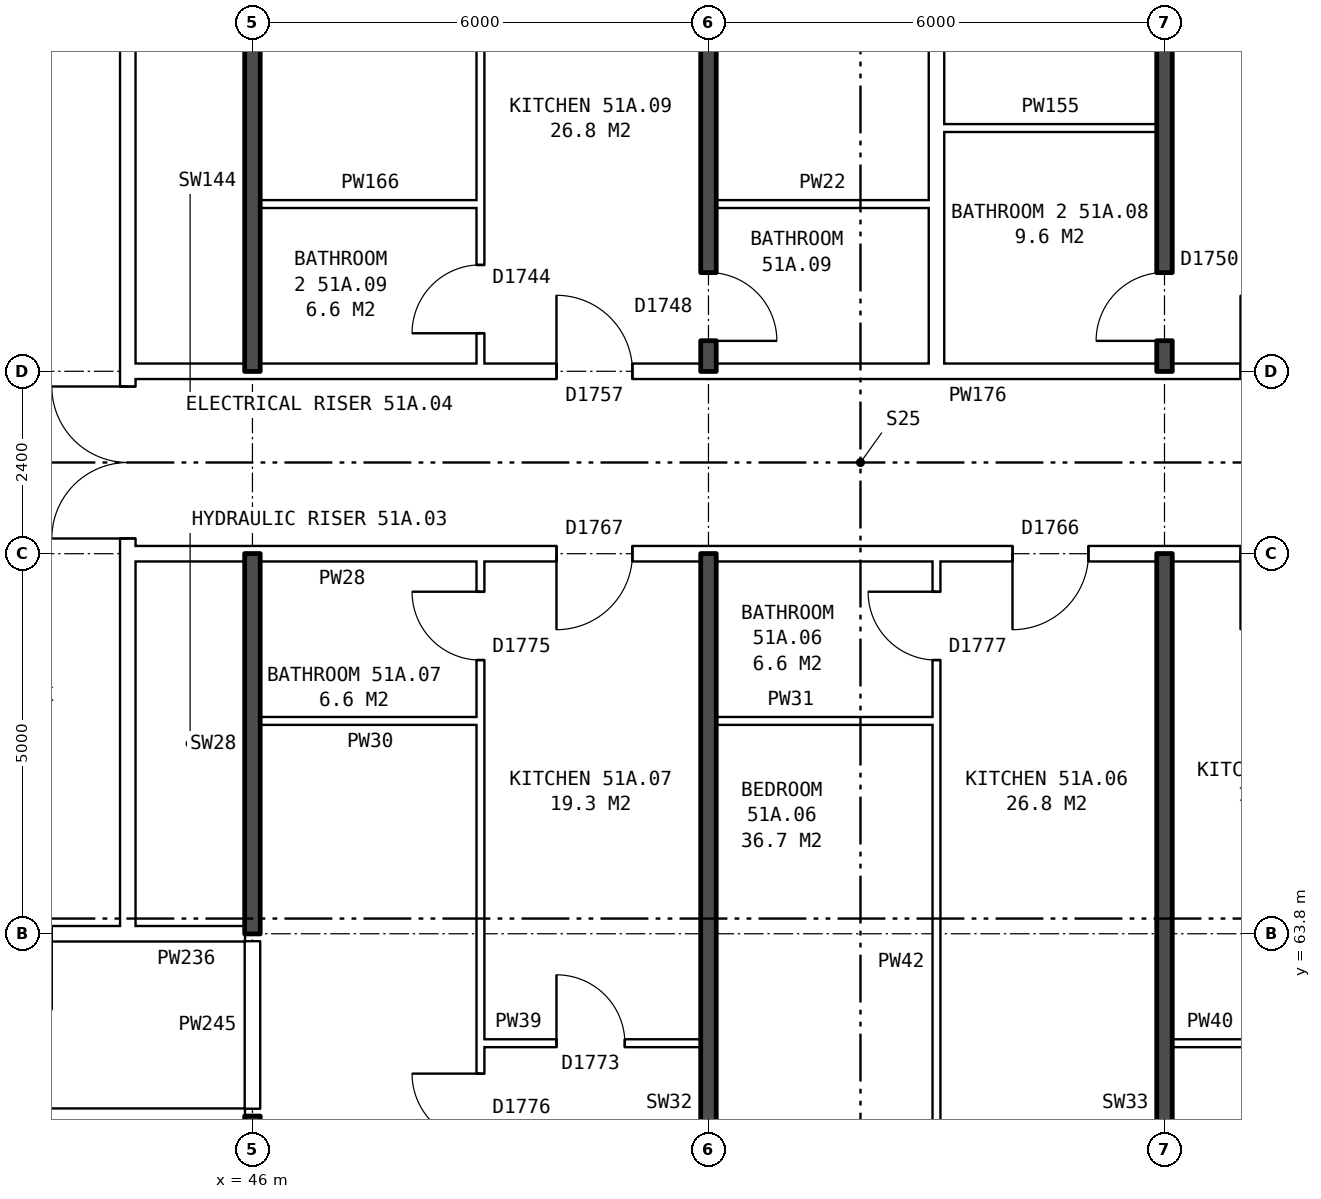
"""IFC4 building model, lengths in metres.
Left out: names, types, materials, properties, quantities, classifications, styles, units other than length and angle.
Written with IfcOpenShell. Run it as: python <this file> out.ifc"""

import sys

from ifc_helpers import new_model, si_unit, direction, frame, frame_2d, origin, place, context, subcontext, project, spatial, rectangle, extrude, element, fill, save


model = new_model("IFC4")
c1 = context("Model", 3, precision=1e-05, world=origin(), true_north=direction((0.0, 1.0)))
c2 = subcontext(c1, "Body", "Model", "MODEL_VIEW")
j1 = project(units=[si_unit("LENGTHUNIT", "METRE"), si_unit("PLANEANGLEUNIT", "RADIAN")], contexts=[c1])
p1 = place(None, origin())
s1 = spatial("IfcSite", under=j1, at=p1, CompositionType="ELEMENT")
p2 = place(p1, origin())
s2 = spatial("IfcBuilding", under=s1, at=p2, CompositionType="ELEMENT")
p3 = place(p2, frame((0.0, 0.0, 182.0)))
s3 = spatial("IfcBuildingStorey", under=s2, at=p3, CompositionType="ELEMENT", Elevation=182.0)
p4 = place(p3, frame((44.36, 63.9, 0.0), z_axis=(0.0, 0.0, 1.0), x_axis=(0.0, 1.0, 0.0)))
e1 = element("IfcWall", 1, at=p4, inside=s3, PredefinedType="PARTITIONING", context=c2, shape_type="SweptSolid", body=[
    extrude(rectangle(XDim=12.2, YDim=0.2, at=frame_2d((6.1, 0.0))), origin(), (0.0, 0.0, 1.0), 2.85),
])
p5 = place(p4, frame((5.1, 0.0, 0.0)))
e2 = element("IfcOpeningElement", 2, at=p5, cuts=e1, PredefinedType="OPENING", context=c2, shape_type="SweptSolid", body=[
    extrude(rectangle(XDim=2.0, YDim=2.1, at=frame_2d((1.0, 1.05))), frame((0.0, 0.11, 0.0), z_axis=(0.0, -1.0, 0.0), x_axis=(1.0, 0.0, 0.0)), (0.0, 0.0, 1.0), 0.22),
])
p6 = place(p3, frame((30.61, 61.4, 0.0), z_axis=(0.0, 0.0, 1.0), x_axis=(1.0, 0.0, 0.0)))
e3 = element("IfcWall", 3, at=p6, inside=s3, PredefinedType="PARTITIONING", context=c2, shape_type="SweptSolid", body=[
    extrude(rectangle(XDim=15.29, YDim=0.2, at=frame_2d((7.645, 0.0))), origin(), (0.0, 0.0, 1.0), 2.85),
])
p7 = place(p6, frame((10.69, 0.0, 0.0)))
e4 = element("IfcOpeningElement", 4, at=p7, cuts=e3, PredefinedType="OPENING", context=c2, shape_type="SweptSolid", body=[
    extrude(rectangle(XDim=1.0, YDim=2.1, at=frame_2d((0.5, 1.05))), frame((0.0, 0.11, 0.0), z_axis=(0.0, -1.0, 0.0), x_axis=(1.0, 0.0, 0.0)), (0.0, 0.0, 1.0), 0.22),
])
p8 = place(p6, frame((5.89, 0.0, 0.0)))
e5 = element("IfcOpeningElement", 5, at=p8, cuts=e3, PredefinedType="OPENING", context=c2, shape_type="SweptSolid", body=[
    extrude(rectangle(XDim=1.0, YDim=2.1, at=frame_2d((0.5, 1.05))), frame((0.0, 0.11, 0.0), z_axis=(0.0, -1.0, 0.0), x_axis=(1.0, 0.0, 0.0)), (0.0, 0.0, 1.0), 0.22),
])
p9 = place(p3, frame((49.0, 62.36, 0.0), z_axis=(0.0, 0.0, 1.0), x_axis=(1.0, 0.0, 0.0)))
e6 = element("IfcWall", 6, at=p9, inside=s3, PredefinedType="PARTITIONING", context=c2, shape_type="SweptSolid", body=[
    extrude(rectangle(XDim=2.9, YDim=0.1, at=frame_2d((1.45, 0.0))), origin(), (0.0, 0.0, 1.0), 2.85),
])
p10 = place(p9, frame((1.0, 0.0, 0.0)))
e7 = element("IfcOpeningElement", 7, at=p10, cuts=e6, PredefinedType="OPENING", context=c2, shape_type="SweptSolid", body=[
    extrude(rectangle(XDim=0.9, YDim=2.1, at=frame_2d((0.45, 1.05))), frame((0.0, 0.06, 0.0), z_axis=(0.0, -1.0, 0.0), x_axis=(1.0, 0.0, 0.0)), (0.0, 0.0, 1.0), 0.12),
])
p11 = place(p3, frame((58.1, 62.36, 0.0), z_axis=(0.0, 0.0, 1.0), x_axis=(1.0, 0.0, 0.0)))
e8 = element("IfcWall", 8, at=p11, inside=s3, PredefinedType="PARTITIONING", context=c2, shape_type="SweptSolid", body=[
    extrude(rectangle(XDim=2.9, YDim=0.1, at=frame_2d((1.45, 0.0))), origin(), (0.0, 0.0, 1.0), 2.85),
])
p12 = place(p11, frame((1.0, 0.0, 0.0)))
e9 = element("IfcOpeningElement", 9, at=p12, cuts=e8, PredefinedType="OPENING", context=c2, shape_type="SweptSolid", body=[
    extrude(rectangle(XDim=0.9, YDim=2.1, at=frame_2d((0.45, 1.05))), frame((0.0, 0.06, 0.0), z_axis=(0.0, -1.0, 0.0), x_axis=(1.0, 0.0, 0.0)), (0.0, 0.0, 1.0), 0.12),
])
p13 = place(p3, frame((41.36, 63.8, 0.0), z_axis=(0.0, 0.0, 1.0), x_axis=(1.0, 0.0, 0.0)))
e10 = element("IfcWall", 10, at=p13, inside=s3, PredefinedType="PARTITIONING", context=c2, shape_type="SweptSolid", body=[
    extrude(rectangle(XDim=3.0, YDim=0.2, at=frame_2d((1.5, 0.0))), origin(), (0.0, 0.0, 1.0), 2.85),
])
p14 = place(p13, frame((1.0, 0.0, 0.0)))
e11 = element("IfcOpeningElement", 11, at=p14, cuts=e10, PredefinedType="OPENING", context=c2, shape_type="SweptSolid", body=[
    extrude(rectangle(XDim=1.0, YDim=2.1, at=frame_2d((0.5, 1.05))), frame((0.0, 0.11, 0.0), z_axis=(0.0, -1.0, 0.0), x_axis=(1.0, 0.0, 0.0)), (0.0, 0.0, 1.0), 0.22),
])
p15 = place(p3, frame((44.36, 63.8, 0.0), z_axis=(0.0, 0.0, 1.0), x_axis=(1.0, 0.0, 0.0)))
e12 = element("IfcWall", 12, at=p15, inside=s3, PredefinedType="PARTITIONING", context=c2, shape_type="SweptSolid", body=[
    extrude(rectangle(XDim=1.54, YDim=0.2, at=frame_2d((0.77, 0.0))), origin(), (0.0, 0.0, 1.0), 2.85),
])
for number, where, z_axis, x_axis in (
    (13, (46.1, 66.6, 0.0), (0.0, 0.0, 1.0), (1.0, 0.0, 0.0)),
    (14, (52.1, 66.6, 0.0), (0.0, 0.0, 1.0), (1.0, 0.0, 0.0)),
):
    element("IfcWall", number, at=place(p3, frame(where, z_axis=z_axis, x_axis=x_axis)), inside=s3, PredefinedType="PARTITIONING", context=c2, shape_type="SweptSolid", body=[
        extrude(rectangle(XDim=2.9, YDim=0.1, at=frame_2d((1.45, 0.0))), origin(), (0.0, 0.0, 1.0), 2.85),
    ])
p16 = place(p3, frame((44.36, 68.8, 0.0), z_axis=(0.0, 0.0, 1.0), x_axis=(1.0, 0.0, 0.0)))
e15 = element("IfcWall", 15, at=p16, inside=s3, PredefinedType="PARTITIONING", context=c2, shape_type="SweptSolid", body=[
    extrude(rectangle(XDim=19.28, YDim=0.2, at=frame_2d((9.64, 0.0))), origin(), (0.0, 0.0, 1.0), 2.85),
])
p17 = place(p16, frame((14.64, 0.0, 0.0)))
e16 = element("IfcOpeningElement", 16, at=p17, cuts=e15, PredefinedType="OPENING", context=c2, shape_type="SweptSolid", body=[
    extrude(rectangle(XDim=1.0, YDim=2.1, at=frame_2d((0.5, 1.05))), frame((0.0, 0.11, 0.0), z_axis=(0.0, -1.0, 0.0), x_axis=(1.0, 0.0, 0.0)), (0.0, 0.0, 1.0), 0.22),
])
p18 = place(p16, frame((11.64, 0.0, 0.0)))
e17 = element("IfcOpeningElement", 17, at=p18, cuts=e15, PredefinedType="OPENING", context=c2, shape_type="SweptSolid", body=[
    extrude(rectangle(XDim=1.0, YDim=2.1, at=frame_2d((0.5, 1.05))), frame((0.0, 0.11, 0.0), z_axis=(0.0, -1.0, 0.0), x_axis=(1.0, 0.0, 0.0)), (0.0, 0.0, 1.0), 0.22),
])
p19 = place(p16, frame((5.64, 0.0, 0.0)))
e18 = element("IfcOpeningElement", 18, at=p19, cuts=e15, PredefinedType="OPENING", context=c2, shape_type="SweptSolid", body=[
    extrude(rectangle(XDim=1.0, YDim=2.1, at=frame_2d((0.5, 1.05))), frame((0.0, 0.11, 0.0), z_axis=(0.0, -1.0, 0.0), x_axis=(1.0, 0.0, 0.0)), (0.0, 0.0, 1.0), 0.22),
])
p20 = place(p3, frame((44.36, 71.2, 0.0), z_axis=(0.0, 0.0, 1.0), x_axis=(1.0, 0.0, 0.0)))
e19 = element("IfcWall", 19, at=p20, inside=s3, PredefinedType="PARTITIONING", context=c2, shape_type="SweptSolid", body=[
    extrude(rectangle(XDim=19.28, YDim=0.2, at=frame_2d((9.64, 0.0))), origin(), (0.0, 0.0, 1.0), 2.85),
])
p21 = place(p20, frame((14.64, 0.0, 0.0)))
e20 = element("IfcOpeningElement", 20, at=p21, cuts=e19, PredefinedType="OPENING", context=c2, shape_type="SweptSolid", body=[
    extrude(rectangle(XDim=1.0, YDim=2.1, at=frame_2d((0.5, 1.05))), frame((0.0, 0.11, 0.0), z_axis=(0.0, -1.0, 0.0), x_axis=(1.0, 0.0, 0.0)), (0.0, 0.0, 1.0), 0.22),
])
p22 = place(p20, frame((5.64, 0.0, 0.0)))
e21 = element("IfcOpeningElement", 21, at=p22, cuts=e19, PredefinedType="OPENING", context=c2, shape_type="SweptSolid", body=[
    extrude(rectangle(XDim=1.0, YDim=2.1, at=frame_2d((0.5, 1.05))), frame((0.0, 0.11, 0.0), z_axis=(0.0, -1.0, 0.0), x_axis=(1.0, 0.0, 0.0)), (0.0, 0.0, 1.0), 0.22),
])
p23 = place(p3, frame((46.1, 73.4, 0.0), z_axis=(0.0, 0.0, 1.0), x_axis=(1.0, 0.0, 0.0)))
e22 = element("IfcWall", 22, at=p23, inside=s3, PredefinedType="PARTITIONING", context=c2, shape_type="SweptSolid", body=[
    extrude(rectangle(XDim=2.9, YDim=0.1, at=frame_2d((1.45, 0.0))), origin(), (0.0, 0.0, 1.0), 2.85),
])
for number, where, z_axis, x_axis in (
    (23, (52.1, 73.4, 0.0), (0.0, 0.0, 1.0), (1.0, 0.0, 0.0)),
    (24, (55.1, 74.4, 0.0), (0.0, 0.0, 1.0), (1.0, 0.0, 0.0)),
):
    element("IfcWall", number, at=place(p3, frame(where, z_axis=z_axis, x_axis=x_axis)), inside=s3, PredefinedType="PARTITIONING", context=c2, shape_type="SweptSolid", body=[
        extrude(rectangle(XDim=2.8, YDim=0.1, at=frame_2d((1.4, 0.0))), origin(), (0.0, 0.0, 1.0), 2.85),
    ])
p24 = place(p3, frame((46.0, 54.36, 0.0), z_axis=(0.0, 0.0, 1.0), x_axis=(0.0, 1.0, 0.0)))
e25 = element("IfcWall", 25, at=p24, inside=s3, PredefinedType="SOLIDWALL", context=c2, shape_type="SweptSolid", body=[
    extrude(rectangle(XDim=7.04, YDim=0.2, at=frame_2d((3.52, 0.0))), origin(), (0.0, 0.0, 1.0), 2.85),
])
p25 = place(p3, frame((46.0, 61.5, 0.0), z_axis=(0.0, 0.0, 1.0), x_axis=(0.0, 1.0, 0.0)))
e26 = element("IfcWall", 26, at=p25, inside=s3, PredefinedType="PARTITIONING", context=c2, shape_type="SweptSolid", body=[
    extrude(rectangle(XDim=2.2, YDim=0.2, at=frame_2d((1.1, 0.0))), origin(), (0.0, 0.0, 1.0), 2.85),
])
for number, where, z_axis, x_axis in (
    (27, (46.0, 63.8, 0.0), (0.0, 0.0, 1.0), (0.0, 1.0, 0.0)),
    (28, (46.0, 71.2, 0.0), (0.0, 0.0, 1.0), (0.0, 1.0, 0.0)),
):
    element("IfcWall", number, at=place(p3, frame(where, z_axis=z_axis, x_axis=x_axis)), inside=s3, PredefinedType="SOLIDWALL", context=c2, shape_type="SweptSolid", body=[
        extrude(rectangle(XDim=5.0, YDim=0.2, at=frame_2d((2.5, 0.0))), origin(), (0.0, 0.0, 1.0), 2.85),
    ])
p26 = place(p3, frame((49.0, 54.36, 0.0), z_axis=(0.0, 0.0, 1.0), x_axis=(0.0, 1.0, 0.0)))
e29 = element("IfcWall", 29, at=p26, inside=s3, PredefinedType="PARTITIONING", context=c2, shape_type="SweptSolid", body=[
    extrude(rectangle(XDim=14.34, YDim=0.1, at=frame_2d((7.17, 0.0))), origin(), (0.0, 0.0, 1.0), 2.85),
])
p27 = place(p26, frame((6.7, 0.0, 0.0)))
e30 = element("IfcOpeningElement", 30, at=p27, cuts=e29, PredefinedType="OPENING", context=c2, shape_type="SweptSolid", body=[
    extrude(rectangle(XDim=0.9, YDim=2.1, at=frame_2d((0.45, 1.05))), frame((0.0, 0.06, 0.0), z_axis=(0.0, -1.0, 0.0), x_axis=(1.0, 0.0, 0.0)), (0.0, 0.0, 1.0), 0.12),
])
p28 = place(p26, frame((13.04, 0.0, 0.0)))
e31 = element("IfcOpeningElement", 31, at=p28, cuts=e29, PredefinedType="OPENING", context=c2, shape_type="SweptSolid", body=[
    extrude(rectangle(XDim=0.9, YDim=2.1, at=frame_2d((0.45, 1.05))), frame((0.0, 0.06, 0.0), z_axis=(0.0, -1.0, 0.0), x_axis=(1.0, 0.0, 0.0)), (0.0, 0.0, 1.0), 0.12),
])
p29 = place(p3, frame((49.0, 71.3, 0.0), z_axis=(0.0, 0.0, 1.0), x_axis=(0.0, 1.0, 0.0)))
e32 = element("IfcWall", 32, at=p29, inside=s3, PredefinedType="PARTITIONING", context=c2, shape_type="SweptSolid", body=[
    extrude(rectangle(XDim=14.34, YDim=0.1, at=frame_2d((7.17, 0.0))), origin(), (0.0, 0.0, 1.0), 2.85),
])
p30 = place(p29, frame((9.24, 0.0, 0.0)))
e33 = element("IfcOpeningElement", 33, at=p30, cuts=e32, PredefinedType="OPENING", context=c2, shape_type="SweptSolid", body=[
    extrude(rectangle(XDim=0.9, YDim=2.1, at=frame_2d((0.45, 1.05))), frame((0.0, 0.06, 0.0), z_axis=(0.0, -1.0, 0.0), x_axis=(1.0, 0.0, 0.0)), (0.0, 0.0, 1.0), 0.12),
])
p31 = place(p29, frame((0.4, 0.0, 0.0)))
e34 = element("IfcOpeningElement", 34, at=p31, cuts=e32, PredefinedType="OPENING", context=c2, shape_type="SweptSolid", body=[
    extrude(rectangle(XDim=0.9, YDim=2.1, at=frame_2d((0.45, 1.05))), frame((0.0, 0.06, 0.0), z_axis=(0.0, -1.0, 0.0), x_axis=(1.0, 0.0, 0.0)), (0.0, 0.0, 1.0), 0.12),
])
p32 = place(p3, frame((52.0, 54.36, 0.0), z_axis=(0.0, 0.0, 1.0), x_axis=(0.0, 1.0, 0.0)))
e35 = element("IfcWall", 35, at=p32, inside=s3, PredefinedType="SOLIDWALL", context=c2, shape_type="SweptSolid", body=[
    extrude(rectangle(XDim=14.44, YDim=0.2, at=frame_2d((7.22, 0.0))), origin(), (0.0, 0.0, 1.0), 2.85),
])
p33 = place(p3, frame((52.0, 71.2, 0.0), z_axis=(0.0, 0.0, 1.0), x_axis=(0.0, 1.0, 0.0)))
e36 = element("IfcWall", 36, at=p33, inside=s3, PredefinedType="SOLIDWALL", context=c2, shape_type="SweptSolid", body=[
    extrude(rectangle(XDim=14.44, YDim=0.2, at=frame_2d((7.22, 0.0))), origin(), (0.0, 0.0, 1.0), 2.85),
])
p34 = place(p33, frame((9.34, 0.0, 0.0)))
e37 = element("IfcOpeningElement", 37, at=p34, cuts=e36, PredefinedType="OPENING", context=c2, shape_type="SweptSolid", body=[
    extrude(rectangle(XDim=0.9, YDim=2.1, at=frame_2d((0.45, 1.05))), frame((0.0, 0.11, 0.0), z_axis=(0.0, -1.0, 0.0), x_axis=(1.0, 0.0, 0.0)), (0.0, 0.0, 1.0), 0.22),
])
p35 = place(p33, frame((0.4, 0.0, 0.0)))
e38 = element("IfcOpeningElement", 38, at=p35, cuts=e36, PredefinedType="OPENING", context=c2, shape_type="SweptSolid", body=[
    extrude(rectangle(XDim=0.9, YDim=2.1, at=frame_2d((0.45, 1.05))), frame((0.0, 0.11, 0.0), z_axis=(0.0, -1.0, 0.0), x_axis=(1.0, 0.0, 0.0)), (0.0, 0.0, 1.0), 0.22),
])
p36 = place(p3, frame((55.0, 54.36, 0.0), z_axis=(0.0, 0.0, 1.0), x_axis=(0.0, 1.0, 0.0)))
e39 = element("IfcWall", 39, at=p36, inside=s3, PredefinedType="PARTITIONING", context=c2, shape_type="SweptSolid", body=[
    extrude(rectangle(XDim=14.34, YDim=0.1, at=frame_2d((7.17, 0.0))), origin(), (0.0, 0.0, 1.0), 2.85),
])
p37 = place(p36, frame((4.2, 0.0, 0.0)))
e40 = element("IfcOpeningElement", 40, at=p37, cuts=e39, PredefinedType="OPENING", context=c2, shape_type="SweptSolid", body=[
    extrude(rectangle(XDim=0.9, YDim=2.1, at=frame_2d((0.45, 1.05))), frame((0.0, 0.06, 0.0), z_axis=(0.0, -1.0, 0.0), x_axis=(1.0, 0.0, 0.0)), (0.0, 0.0, 1.0), 0.12),
])
p38 = place(p36, frame((13.04, 0.0, 0.0)))
e41 = element("IfcOpeningElement", 41, at=p38, cuts=e39, PredefinedType="OPENING", context=c2, shape_type="SweptSolid", body=[
    extrude(rectangle(XDim=0.9, YDim=2.1, at=frame_2d((0.45, 1.05))), frame((0.0, 0.06, 0.0), z_axis=(0.0, -1.0, 0.0), x_axis=(1.0, 0.0, 0.0)), (0.0, 0.0, 1.0), 0.12),
])
p39 = place(p3, frame((55.0, 71.3, 0.0), z_axis=(0.0, 0.0, 1.0), x_axis=(0.0, 1.0, 0.0)))
e42 = element("IfcWall", 42, at=p39, inside=s3, PredefinedType="PARTITIONING", context=c2, shape_type="SweptSolid", body=[
    extrude(rectangle(XDim=14.34, YDim=0.2, at=frame_2d((7.17, 0.0))), origin(), (0.0, 0.0, 1.0), 2.85),
])
p40 = place(p3, frame((58.0, 54.36, 0.0), z_axis=(0.0, 0.0, 1.0), x_axis=(0.0, 1.0, 0.0)))
e43 = element("IfcWall", 43, at=p40, inside=s3, PredefinedType="SOLIDWALL", context=c2, shape_type="SweptSolid", body=[
    extrude(rectangle(XDim=14.44, YDim=0.2, at=frame_2d((7.22, 0.0))), origin(), (0.0, 0.0, 1.0), 2.85),
])
p41 = place(p3, frame((58.0, 71.2, 0.0), z_axis=(0.0, 0.0, 1.0), x_axis=(0.0, 1.0, 0.0)))
e44 = element("IfcWall", 44, at=p41, inside=s3, PredefinedType="SOLIDWALL", context=c2, shape_type="SweptSolid", body=[
    extrude(rectangle(XDim=14.44, YDim=0.2, at=frame_2d((7.22, 0.0))), origin(), (0.0, 0.0, 1.0), 2.85),
])
p42 = place(p41, frame((9.34, 0.0, 0.0)))
e45 = element("IfcOpeningElement", 45, at=p42, cuts=e44, PredefinedType="OPENING", context=c2, shape_type="SweptSolid", body=[
    extrude(rectangle(XDim=0.9, YDim=2.1, at=frame_2d((0.45, 1.05))), frame((0.0, 0.11, 0.0), z_axis=(0.0, -1.0, 0.0), x_axis=(1.0, 0.0, 0.0)), (0.0, 0.0, 1.0), 0.22),
])
p43 = place(p41, frame((0.4, 0.0, 0.0)))
e46 = element("IfcOpeningElement", 46, at=p43, cuts=e44, PredefinedType="OPENING", context=c2, shape_type="SweptSolid", body=[
    extrude(rectangle(XDim=0.9, YDim=2.1, at=frame_2d((0.45, 1.05))), frame((0.0, 0.11, 0.0), z_axis=(0.0, -1.0, 0.0), x_axis=(1.0, 0.0, 0.0)), (0.0, 0.0, 1.0), 0.22),
])
p44 = place(p5, origin())
e47 = element("IfcDoor", 47, at=p44, inside=s3, OperationType="DOUBLE_DOOR_SINGLE_SWING", PredefinedType="DOOR", context=c2, shape_type="SweptSolid", body=[
    extrude(rectangle(XDim=2.0, YDim=2.1, at=frame_2d((1.0, 1.05))), frame((0.0, 0.025, 0.0), z_axis=(0.0, -1.0, 0.0), x_axis=(1.0, 0.0, 0.0)), (0.0, 0.0, 1.0), 0.05),
])
fill(e2, e47)
p45 = place(p18, frame((1.0, 0.0, 0.0), z_axis=(0.0, 0.0, 1.0), x_axis=(-1.0, 0.0, 0.0)))
e48 = element("IfcDoor", 48, at=p45, inside=s3, OperationType="SINGLE_SWING_RIGHT", PredefinedType="DOOR", context=c2, shape_type="SweptSolid", body=[
    extrude(rectangle(XDim=1.0, YDim=2.1, at=frame_2d((0.5, 1.05))), frame((0.0, 0.025, 0.0), z_axis=(0.0, -1.0, 0.0), x_axis=(1.0, 0.0, 0.0)), (0.0, 0.0, 1.0), 0.05),
])
fill(e17, e48)
p46 = place(p38, origin())
e49 = element("IfcDoor", 49, at=p46, inside=s3, OperationType="SINGLE_SWING_RIGHT", PredefinedType="DOOR", context=c2, shape_type="SweptSolid", body=[
    extrude(rectangle(XDim=0.9, YDim=2.1, at=frame_2d((0.45, 1.05))), frame((0.0, 0.025, 0.0), z_axis=(0.0, -1.0, 0.0), x_axis=(1.0, 0.0, 0.0)), (0.0, 0.0, 1.0), 0.05),
])
fill(e41, e49)
p47 = place(p27, origin())
e50 = element("IfcDoor", 50, at=p47, inside=s3, OperationType="SINGLE_SWING_RIGHT", PredefinedType="DOOR", context=c2, shape_type="SweptSolid", body=[
    extrude(rectangle(XDim=0.9, YDim=2.1, at=frame_2d((0.45, 1.05))), frame((0.0, 0.025, 0.0), z_axis=(0.0, -1.0, 0.0), x_axis=(1.0, 0.0, 0.0)), (0.0, 0.0, 1.0), 0.05),
])
fill(e30, e50)
p48 = place(p19, frame((1.0, 0.0, 0.0), z_axis=(0.0, 0.0, 1.0), x_axis=(-1.0, 0.0, 0.0)))
e51 = element("IfcDoor", 51, at=p48, inside=s3, OperationType="SINGLE_SWING_RIGHT", PredefinedType="DOOR", context=c2, shape_type="SweptSolid", body=[
    extrude(rectangle(XDim=1.0, YDim=2.1, at=frame_2d((0.5, 1.05))), frame((0.0, 0.025, 0.0), z_axis=(0.0, -1.0, 0.0), x_axis=(1.0, 0.0, 0.0)), (0.0, 0.0, 1.0), 0.05),
])
fill(e18, e51)
p49 = place(p10, origin())
e52 = element("IfcDoor", 52, at=p49, inside=s3, OperationType="SINGLE_SWING_LEFT", PredefinedType="DOOR", context=c2, shape_type="SweptSolid", body=[
    extrude(rectangle(XDim=0.9, YDim=2.1, at=frame_2d((0.45, 1.05))), frame((0.0, 0.025, 0.0), z_axis=(0.0, -1.0, 0.0), x_axis=(1.0, 0.0, 0.0)), (0.0, 0.0, 1.0), 0.05),
])
fill(e7, e52)
p50 = place(p28, origin())
e53 = element("IfcDoor", 53, at=p50, inside=s3, OperationType="SINGLE_SWING_RIGHT", PredefinedType="DOOR", context=c2, shape_type="SweptSolid", body=[
    extrude(rectangle(XDim=0.9, YDim=2.1, at=frame_2d((0.45, 1.05))), frame((0.0, 0.025, 0.0), z_axis=(0.0, -1.0, 0.0), x_axis=(1.0, 0.0, 0.0)), (0.0, 0.0, 1.0), 0.05),
])
fill(e31, e53)
p51 = place(p43, origin())
e54 = element("IfcDoor", 54, at=p51, inside=s3, OperationType="SINGLE_SWING_LEFT", PredefinedType="DOOR", context=c2, shape_type="SweptSolid", body=[
    extrude(rectangle(XDim=0.9, YDim=2.1, at=frame_2d((0.45, 1.05))), frame((0.0, 0.025, 0.0), z_axis=(0.0, -1.0, 0.0), x_axis=(1.0, 0.0, 0.0)), (0.0, 0.0, 1.0), 0.05),
])
fill(e46, e54)
p52 = place(p22, origin())
e55 = element("IfcDoor", 55, at=p52, inside=s3, OperationType="SINGLE_SWING_LEFT", PredefinedType="DOOR", context=c2, shape_type="SweptSolid", body=[
    extrude(rectangle(XDim=1.0, YDim=2.1, at=frame_2d((0.5, 1.05))), frame((0.0, 0.025, 0.0), z_axis=(0.0, -1.0, 0.0), x_axis=(1.0, 0.0, 0.0)), (0.0, 0.0, 1.0), 0.05),
])
fill(e21, e55)
p53 = place(p35, frame((0.9, 0.0, 0.0), z_axis=(0.0, 0.0, 1.0), x_axis=(-1.0, 0.0, 0.0)))
e56 = element("IfcDoor", 56, at=p53, inside=s3, OperationType="SINGLE_SWING_RIGHT", PredefinedType="DOOR", context=c2, shape_type="SweptSolid", body=[
    extrude(rectangle(XDim=0.9, YDim=2.1, at=frame_2d((0.45, 1.05))), frame((0.0, 0.025, 0.0), z_axis=(0.0, -1.0, 0.0), x_axis=(1.0, 0.0, 0.0)), (0.0, 0.0, 1.0), 0.05),
])
fill(e38, e56)
p54 = place(p31, origin())
e57 = element("IfcDoor", 57, at=p54, inside=s3, OperationType="SINGLE_SWING_LEFT", PredefinedType="DOOR", context=c2, shape_type="SweptSolid", body=[
    extrude(rectangle(XDim=0.9, YDim=2.1, at=frame_2d((0.45, 1.05))), frame((0.0, 0.025, 0.0), z_axis=(0.0, -1.0, 0.0), x_axis=(1.0, 0.0, 0.0)), (0.0, 0.0, 1.0), 0.05),
])
fill(e34, e57)
save(model, sys.argv[1])
